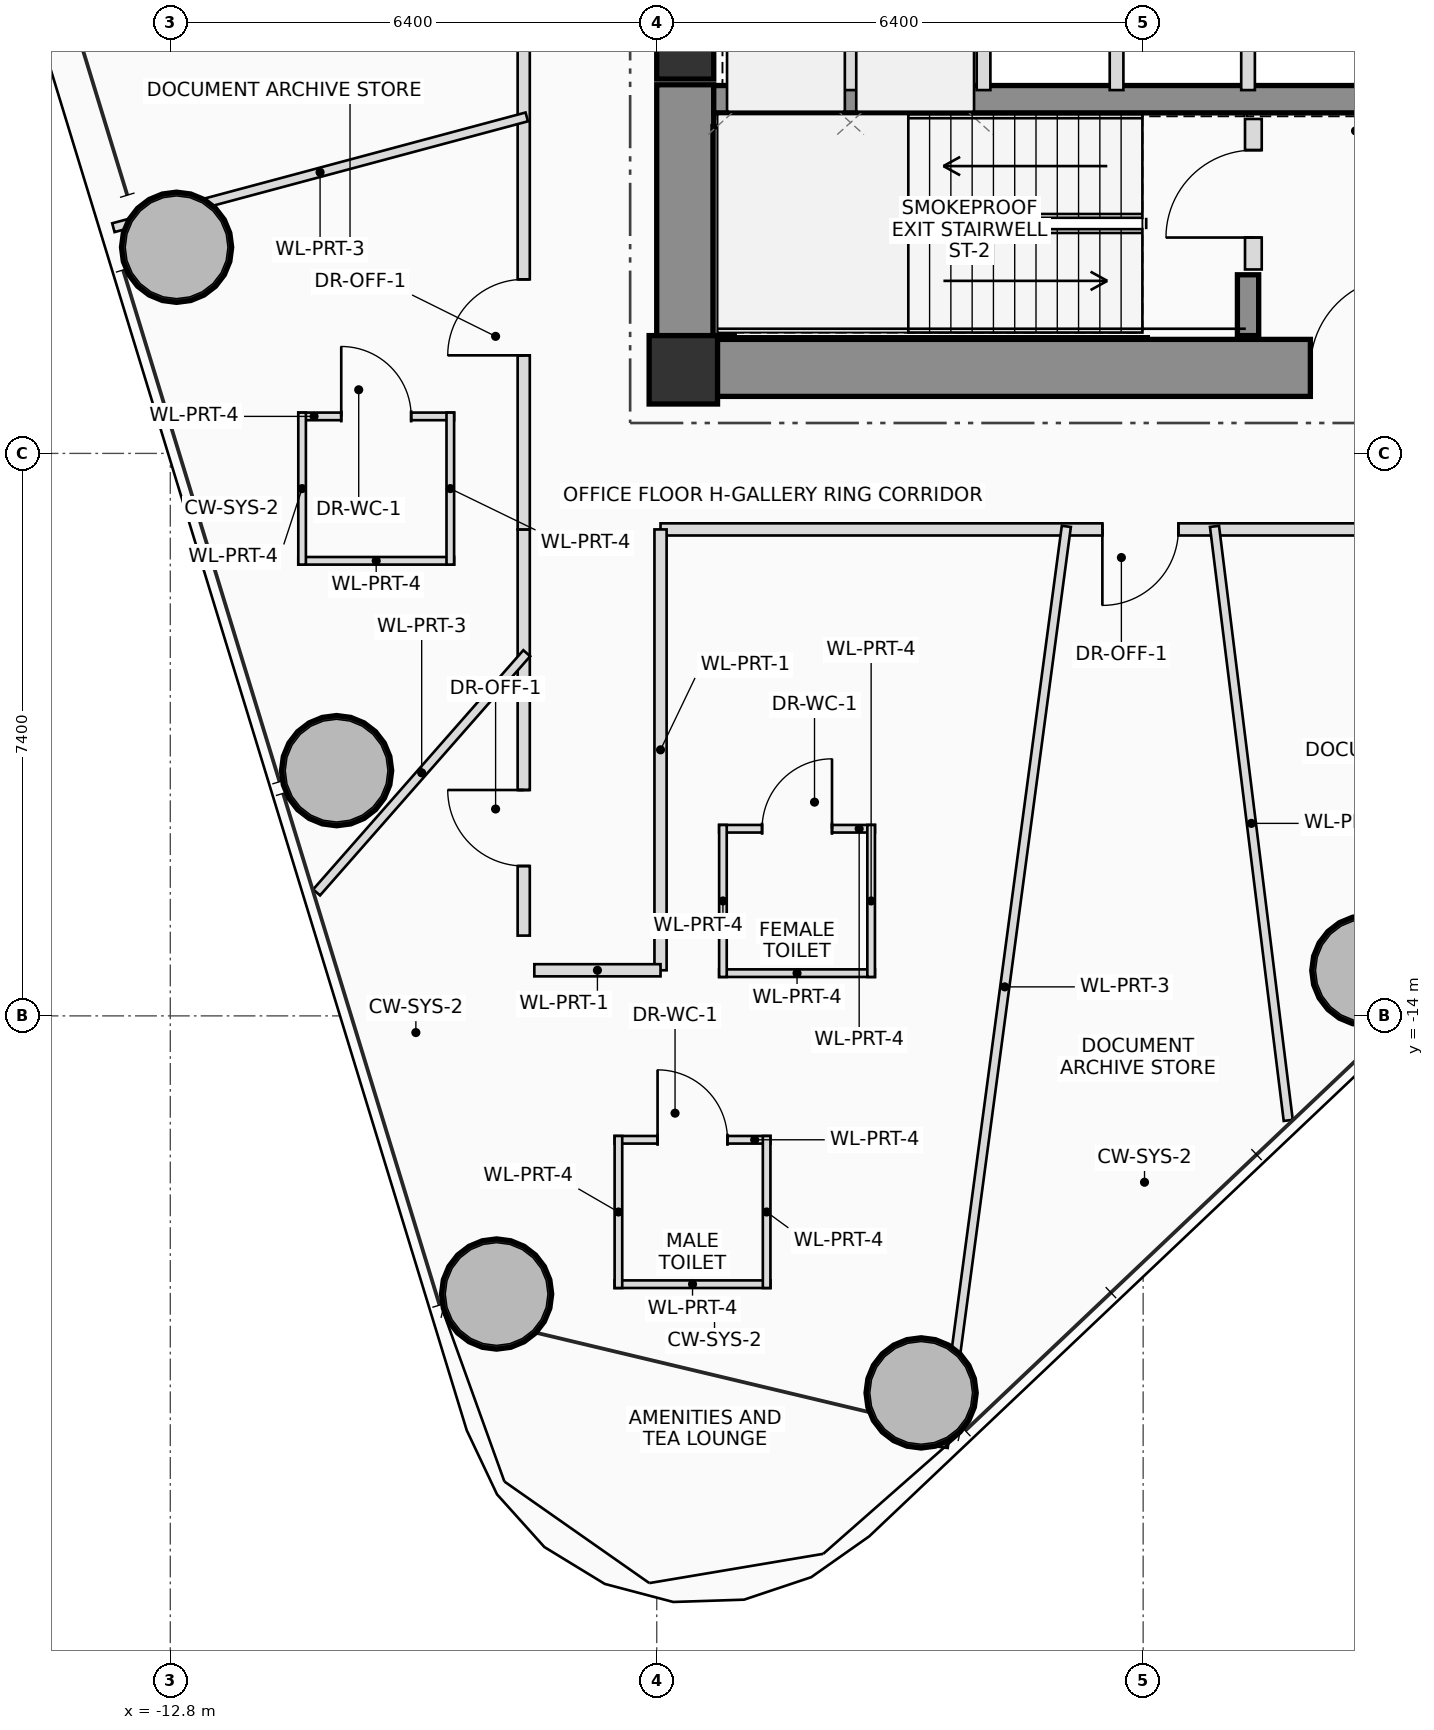
"""IFC4 building model, lengths in metres.
Left out: names, types, materials, properties, quantities, classifications, styles, units other than length and angle.
Written with IfcOpenShell. Run it as: python <this file> out.ifc"""

import sys

from ifc_helpers import new_model, si_unit, direction, frame, frame_2d, origin, origin_2d, place, context, subcontext, project, spatial, rectangle, hollow_circle, extrude, source, transform, mapped, element, fill, save


model = new_model("IFC4")
c1 = context("Model", 3, precision=1e-05, world=origin(), true_north=direction((0.0, 1.0)))
c2 = subcontext(c1, "Body", "Model", "MODEL_VIEW")
j1 = project(units=[si_unit("LENGTHUNIT", "METRE"), si_unit("PLANEANGLEUNIT", "RADIAN")], contexts=[c1])
p1 = place(None, origin())
s1 = spatial("IfcSite", under=j1, at=p1, CompositionType="ELEMENT")
p2 = place(p1, origin())
s2 = spatial("IfcBuilding", under=s1, at=p2, CompositionType="ELEMENT")
p3 = place(p2, frame((0.0, 0.0, 112.4)))
s3 = spatial("IfcBuildingStorey", under=s2, at=p3, CompositionType="ELEMENT", Elevation=112.4)
m1 = source(origin(), c2, "Body", "SweptSolid", [
    extrude(rectangle(XDim=0.9, YDim=0.9, at=origin_2d()), origin(), (0.0, 0.0, 1.0), 3.75),
])
p4 = place(p3, frame((-6.05, -5.5, 0.0), z_axis=(0.0, 0.0, 1.0), x_axis=(1.0, 0.0, 0.0)))
e1 = element("IfcColumn", 1, at=p4, inside=s3, PredefinedType="COLUMN", context=c2, shape_type="MappedRepresentation", body=[
    mapped(m1, transform((0.0, 0.0, 0.0), scale=1.0)),
])
p5 = place(p3, frame((-6.4, -5.475, 0.0), z_axis=(0.0, 0.0, 1.0), x_axis=(1.0, 0.0, 0.0)))
e2 = element("IfcWall", 2, at=p5, inside=s3, PredefinedType="SHEAR", context=c2, shape_type="SweptSolid", body=[
    extrude(rectangle(XDim=12.8, YDim=0.75, at=frame_2d((6.4, 0.0))), origin(), (0.0, 0.0, 1.0), 3.75),
])
p6 = place(p5, frame((8.6, 0.0, 0.0)))
e3 = element("IfcOpeningElement", 3, at=p6, cuts=e2, PredefinedType="OPENING", context=c2, shape_type="SweptSolid", body=[
    extrude(rectangle(XDim=1.2, YDim=2.2, at=frame_2d((0.6, 1.1))), frame((0.0, 0.385, 0.0), z_axis=(0.0, -1.0, 0.0), x_axis=(1.0, 0.0, 0.0)), (0.0, 0.0, 1.0), 0.77),
])
p7 = place(p3, frame((-6.025, -5.1, 0.0), z_axis=(0.0, 0.0, 1.0), x_axis=(0.0, 1.0, 0.0)))
e4 = element("IfcWall", 4, at=p7, inside=s3, PredefinedType="SHEAR", context=c2, shape_type="SweptSolid", body=[
    extrude(rectangle(XDim=3.35, YDim=0.75, at=frame_2d((1.675, 0.0))), origin(), (0.0, 0.0, 1.0), 3.75),
])
p8 = place(p3, frame((-5.65, -1.94, 0.0), z_axis=(0.0, 0.0, 1.0), x_axis=(1.0, 0.0, 0.0)))
e5 = element("IfcWall", 5, at=p8, inside=s3, PredefinedType="SHEAR", context=c2, shape_type="SweptSolid", body=[
    extrude(rectangle(XDim=11.3, YDim=0.36, at=frame_2d((5.65, 0.0))), origin(), (0.0, 0.0, 1.0), 3.75),
])
p9 = place(p3, frame((-5.52, -5.05, 0.0), z_axis=(0.0, 0.0, 1.0), x_axis=(0.0, 1.0, 0.0)))
e6 = element("IfcWall", 6, at=p9, inside=s3, PredefinedType="SHEAR", context=c2, shape_type="SweptSolid", body=[
    extrude(rectangle(XDim=2.75, YDim=0.28, at=frame_2d((1.375, 0.0))), origin(), (0.0, 0.0, 1.0), 3.75),
])
p10 = place(p3, frame((1.38, -5.05, 0.0), z_axis=(0.0, 0.0, 1.0), x_axis=(0.0, 1.0, 0.0)))
e7 = element("IfcWall", 7, at=p10, inside=s3, PredefinedType="SHEAR", context=c2, shape_type="SweptSolid", body=[
    extrude(rectangle(XDim=0.8, YDim=0.28, at=frame_2d((0.4, 0.0))), origin(), (0.0, 0.0, 1.0), 3.75),
])
m2 = source(origin(), c2, "Body", "SweptSolid", [
    extrude(rectangle(XDim=0.75, YDim=0.75, at=origin_2d()), origin(), (0.0, 0.0, 1.0), 3.75),
])
p11 = place(p3, frame((-6.025, -1.3, 0.0), z_axis=(0.0, 0.0, 1.0), x_axis=(1.0, 0.0, 0.0)))
e8 = element("IfcColumn", 8, at=p11, inside=s3, PredefinedType="COLUMN", context=c2, shape_type="MappedRepresentation", body=[
    mapped(m2, transform((0.0, 0.0, 0.0), scale=1.0)),
])
m3 = source(origin(), c2, "Body", "SweptSolid", [
    extrude(hollow_circle(Radius=0.725, WallThickness=0.05, at=origin_2d()), origin(), (0.0, 0.0, 1.0), 3.75),
])
for number, where, z_axis, x_axis in (
    (9, (-2.921, -18.96, 0.0), (0.0, 0.0, 1.0), (1.0, 0.0, 0.0)),
    (10, (2.943, -13.402, 0.0), (0.0, 0.0, 1.0), (1.0, 0.0, 0.0)),
    (11, (-12.717, -3.888, 0.0), (0.0, 0.0, 1.0), (1.0, 0.0, 0.0)),
    (12, (-10.612, -10.774, 0.0), (0.0, 0.0, 1.0), (1.0, 0.0, 0.0)),
    (13, (-8.507, -17.659, 0.0), (0.0, 0.0, 1.0), (1.0, 0.0, 0.0)),
):
    element("IfcColumn", number, at=place(p3, frame(where, z_axis=z_axis, x_axis=x_axis)), inside=s3, PredefinedType="COLUMN", context=c2, shape_type="MappedRepresentation", body=[
        mapped(m3, transform((0.0, 0.0, 0.0), scale=1.0)),
    ])
p12 = place(p3, frame((1.45, -4.18, 0.0), z_axis=(0.0, 0.0, 1.0), x_axis=(0.0, 1.0, 0.0)))
e14 = element("IfcWall", 14, at=p12, inside=s3, PredefinedType="PLUMBINGWALL", context=c2, shape_type="SweptSolid", body=[
    extrude(rectangle(XDim=1.98, YDim=0.22, at=frame_2d((0.99, 0.0))), origin(), (0.0, 0.0, 1.0), 3.545),
])
p13 = place(p12, frame((0.42, 0.0, 0.0)))
e15 = element("IfcOpeningElement", 15, at=p13, cuts=e14, PredefinedType="OPENING", context=c2, shape_type="SweptSolid", body=[
    extrude(rectangle(XDim=1.15, YDim=2.15, at=frame_2d((0.575, 1.075))), frame((0.0, 0.12, 0.0), z_axis=(0.0, -1.0, 0.0), x_axis=(1.0, 0.0, 0.0)), (0.0, 0.0, 1.0), 0.24),
])
for number, where, z_axis, x_axis in (
    (16, (-3.85, -1.82, 0.0), (0.0, 0.0, 1.0), (0.0, 1.0, 0.0)),
    (17, (-2.1, -1.82, 0.0), (0.0, 0.0, 1.0), (0.0, 1.0, 0.0)),
    (18, (-0.35, -1.82, 0.0), (0.0, 0.0, 1.0), (0.0, 1.0, 0.0)),
    (19, (1.38, -1.82, 0.0), (0.0, 0.0, 1.0), (0.0, 1.0, 0.0)),
):
    element("IfcWall", number, at=place(p3, frame(where, z_axis=z_axis, x_axis=x_axis)), inside=s3, PredefinedType="PLUMBINGWALL", context=c2, shape_type="SweptSolid", body=[
        extrude(rectangle(XDim=0.98, YDim=0.18, at=frame_2d((0.49, 0.0))), origin(), (0.0, 0.0, 1.0), 3.545),
    ])
p14 = place(p3, frame((-6.954, -15.63, 0.0), z_axis=(0.0, 0.0, 1.0), x_axis=(1.0, 0.0, 0.0)))
e20 = element("IfcWall", 20, at=p14, inside=s3, PredefinedType="PARTITIONING", context=c2, shape_type="SweptSolid", body=[
    extrude(rectangle(XDim=2.05, YDim=0.1, at=frame_2d((1.025, 0.0))), origin(), (0.0, 0.0, 1.0), 3.545),
])
p15 = place(p14, frame((0.565, 0.0, 0.0)))
e21 = element("IfcOpeningElement", 21, at=p15, cuts=e20, PredefinedType="OPENING", context=c2, shape_type="SweptSolid", body=[
    extrude(rectangle(XDim=0.92, YDim=2.1, at=frame_2d((0.46, 1.05))), frame((0.0, 0.06, 0.0), z_axis=(0.0, -1.0, 0.0), x_axis=(1.0, 0.0, 0.0)), (0.0, 0.0, 1.0), 0.12),
])
p16 = place(p3, frame((-4.904, -17.53, 0.0), z_axis=(0.0, 0.0, 1.0), x_axis=(-1.0, 0.0, 0.0)))
e22 = element("IfcWall", 22, at=p16, inside=s3, PredefinedType="PARTITIONING", context=c2, shape_type="SweptSolid", body=[
    extrude(rectangle(XDim=2.05, YDim=0.1, at=frame_2d((1.025, 0.0))), origin(), (0.0, 0.0, 1.0), 3.545),
])
for number, where, z_axis, x_axis in (
    (23, (-4.954, -15.58, 0.0), (0.0, 0.0, 1.0), (0.0, -1.0, 0.0)),
    (24, (-6.904, -17.58, 0.0), (0.0, 0.0, 1.0), (0.0, 1.0, 0.0)),
):
    element("IfcWall", number, at=place(p3, frame(where, z_axis=z_axis, x_axis=x_axis)), inside=s3, PredefinedType="PARTITIONING", context=c2, shape_type="SweptSolid", body=[
        extrude(rectangle(XDim=2.0, YDim=0.1, at=frame_2d((1.0, 0.0))), origin(), (0.0, 0.0, 1.0), 3.545),
    ])
p17 = place(p3, frame((-5.579, -11.538, 0.0), z_axis=(0.0, 0.0, 1.0), x_axis=(1.0, 0.0, 0.0)))
e25 = element("IfcWall", 25, at=p17, inside=s3, PredefinedType="PARTITIONING", context=c2, shape_type="SweptSolid", body=[
    extrude(rectangle(XDim=2.05, YDim=0.1, at=frame_2d((1.025, 0.0))), origin(), (0.0, 0.0, 1.0), 2.85),
])
p18 = place(p17, frame((0.565, 0.0, 0.0)))
e26 = element("IfcOpeningElement", 26, at=p18, cuts=e25, PredefinedType="OPENING", context=c2, shape_type="SweptSolid", body=[
    extrude(rectangle(XDim=0.92, YDim=2.1, at=frame_2d((0.46, 1.05))), frame((0.0, 0.06, 0.0), z_axis=(0.0, -1.0, 0.0), x_axis=(1.0, 0.0, 0.0)), (0.0, 0.0, 1.0), 0.12),
])
p19 = place(p3, frame((-3.529, -13.438, 0.0), z_axis=(0.0, 0.0, 1.0), x_axis=(-1.0, 0.0, 0.0)))
e27 = element("IfcWall", 27, at=p19, inside=s3, PredefinedType="PARTITIONING", context=c2, shape_type="SweptSolid", body=[
    extrude(rectangle(XDim=2.05, YDim=0.1, at=frame_2d((1.025, 0.0))), origin(), (0.0, 0.0, 1.0), 2.85),
])
for number, where, z_axis, x_axis in (
    (28, (-3.579, -11.488, 0.0), (0.0, 0.0, 1.0), (0.0, -1.0, 0.0)),
    (29, (-5.529, -13.488, 0.0), (0.0, 0.0, 1.0), (0.0, 1.0, 0.0)),
):
    element("IfcWall", number, at=place(p3, frame(where, z_axis=z_axis, x_axis=x_axis)), inside=s3, PredefinedType="PARTITIONING", context=c2, shape_type="SweptSolid", body=[
        extrude(rectangle(XDim=2.0, YDim=0.1, at=frame_2d((1.0, 0.0))), origin(), (0.0, 0.0, 1.0), 3.05),
    ])
p20 = place(p3, frame((-11.116, -6.113, 0.0), z_axis=(0.0, 0.0, 1.0), x_axis=(1.0, 0.0, 0.0)))
e30 = element("IfcWall", 30, at=p20, inside=s3, PredefinedType="PARTITIONING", context=c2, shape_type="SweptSolid", body=[
    extrude(rectangle(XDim=2.05, YDim=0.1, at=frame_2d((1.025, 0.0))), origin(), (0.0, 0.0, 1.0), 3.2),
])
p21 = place(p20, frame((0.565, 0.0, 0.0)))
e31 = element("IfcOpeningElement", 31, at=p21, cuts=e30, PredefinedType="OPENING", context=c2, shape_type="SweptSolid", body=[
    extrude(rectangle(XDim=0.92, YDim=2.1, at=frame_2d((0.46, 1.05))), frame((0.0, 0.06, 0.0), z_axis=(0.0, -1.0, 0.0), x_axis=(1.0, 0.0, 0.0)), (0.0, 0.0, 1.0), 0.12),
])
p22 = place(p3, frame((-9.066, -8.013, 0.0), z_axis=(0.0, 0.0, 1.0), x_axis=(-1.0, 0.0, 0.0)))
e32 = element("IfcWall", 32, at=p22, inside=s3, PredefinedType="PARTITIONING", context=c2, shape_type="SweptSolid", body=[
    extrude(rectangle(XDim=2.05, YDim=0.1, at=frame_2d((1.025, 0.0))), origin(), (0.0, 0.0, 1.0), 3.2),
])
p23 = place(p3, frame((-9.116, -6.063, 0.0), z_axis=(0.0, 0.0, 1.0), x_axis=(0.0, -1.0, 0.0)))
e33 = element("IfcWall", 33, at=p23, inside=s3, PredefinedType="PARTITIONING", context=c2, shape_type="SweptSolid", body=[
    extrude(rectangle(XDim=2.0, YDim=0.1, at=frame_2d((1.0, 0.0))), origin(), (0.0, 0.0, 1.0), 3.05),
])
p24 = place(p3, frame((-11.066, -8.063, 0.0), z_axis=(0.0, 0.0, 1.0), x_axis=(0.0, 1.0, 0.0)))
e34 = element("IfcWall", 34, at=p24, inside=s3, PredefinedType="PARTITIONING", context=c2, shape_type="SweptSolid", body=[
    extrude(rectangle(XDim=2.0, YDim=0.1, at=frame_2d((1.0, 0.0))), origin(), (0.0, 0.0, 1.0), 3.545),
])
p25 = place(p3, frame((-8.15, -12.944, 0.0), z_axis=(0.0, 0.0, 1.0), x_axis=(0.0, 1.0, 0.0)))
e35 = element("IfcWall", 35, at=p25, inside=s3, PredefinedType="PARTITIONING", context=c2, shape_type="SweptSolid", body=[
    extrude(rectangle(XDim=5.344, YDim=0.16, at=frame_2d((2.672, 0.0))), origin(), (0.0, 0.0, 1.0), 2.85),
])
p26 = place(p25, frame((0.916, 0.0, 0.0)))
e36 = element("IfcOpeningElement", 36, at=p26, cuts=e35, PredefinedType="OPENING", context=c2, shape_type="SweptSolid", body=[
    extrude(rectangle(XDim=1.0, YDim=2.25, at=frame_2d((0.5, 1.125))), frame((0.0, 0.09, 0.0), z_axis=(0.0, -1.0, 0.0), x_axis=(1.0, 0.0, 0.0)), (0.0, 0.0, 1.0), 0.18),
])
p27 = place(p3, frame((-8.15, -7.6, 0.0), z_axis=(0.0, 0.0, 1.0), x_axis=(0.0, 1.0, 0.0)))
e37 = element("IfcWall", 37, at=p27, inside=s3, PredefinedType="PARTITIONING", context=c2, shape_type="SweptSolid", body=[
    extrude(rectangle(XDim=15.2, YDim=0.16, at=frame_2d((7.6, 0.0))), origin(), (0.0, 0.0, 1.0), 2.85),
])
p28 = place(p27, frame((2.29, 0.0, 0.0)))
e38 = element("IfcOpeningElement", 38, at=p28, cuts=e37, PredefinedType="OPENING", context=c2, shape_type="SweptSolid", body=[
    extrude(rectangle(XDim=1.0, YDim=2.25, at=frame_2d((0.5, 1.125))), frame((0.0, 0.09, 0.0), z_axis=(0.0, -1.0, 0.0), x_axis=(1.0, 0.0, 0.0)), (0.0, 0.0, 1.0), 0.18),
])
p29 = place(p27, frame((7.0, 0.0, 0.0)))
e39 = element("IfcOpeningElement", 39, at=p29, cuts=e37, PredefinedType="OPENING", context=c2, shape_type="SweptSolid", body=[
    extrude(rectangle(XDim=1.0, YDim=2.25, at=frame_2d((0.5, 1.125))), frame((0.0, 0.09, 0.0), z_axis=(0.0, -1.0, 0.0), x_axis=(1.0, 0.0, 0.0)), (0.0, 0.0, 1.0), 0.18),
])
p30 = place(p27, frame((10.325, 0.0, 0.0)))
e40 = element("IfcOpeningElement", 40, at=p30, cuts=e37, PredefinedType="OPENING", context=c2, shape_type="SweptSolid", body=[
    extrude(rectangle(XDim=1.0, YDim=2.25, at=frame_2d((0.5, 1.125))), frame((0.0, 0.09, 0.0), z_axis=(0.0, -1.0, 0.0), x_axis=(1.0, 0.0, 0.0)), (0.0, 0.0, 1.0), 0.18),
])
p31 = place(p27, frame((13.035, 0.0, 0.0)))
e41 = element("IfcOpeningElement", 41, at=p31, cuts=e37, PredefinedType="OPENING", context=c2, shape_type="SweptSolid", body=[
    extrude(rectangle(XDim=1.0, YDim=2.25, at=frame_2d((0.5, 1.125))), frame((0.0, 0.09, 0.0), z_axis=(0.0, -1.0, 0.0), x_axis=(1.0, 0.0, 0.0)), (0.0, 0.0, 1.0), 0.18),
])
p32 = place(p3, frame((6.35, -7.6, 0.0), z_axis=(0.0, 0.0, 1.0), x_axis=(-1.0, 0.0, 0.0)))
e42 = element("IfcWall", 42, at=p32, inside=s3, PredefinedType="PARTITIONING", context=c2, shape_type="SweptSolid", body=[
    extrude(rectangle(XDim=12.7, YDim=0.16, at=frame_2d((6.35, 0.0))), origin(), (0.0, 0.0, 1.0), 2.85),
])
p33 = place(p32, frame((5.887, 0.0, 0.0)))
e43 = element("IfcOpeningElement", 43, at=p33, cuts=e42, PredefinedType="OPENING", context=c2, shape_type="SweptSolid", body=[
    extrude(rectangle(XDim=1.0, YDim=2.25, at=frame_2d((0.5, 1.125))), frame((0.0, 0.09, 0.0), z_axis=(0.0, -1.0, 0.0), x_axis=(1.0, 0.0, 0.0)), (0.0, 0.0, 1.0), 0.18),
])
p34 = place(p3, frame((-6.35, -7.6, 0.0), z_axis=(0.0, 0.0, 1.0), x_axis=(0.0, -1.0, 0.0)))
e44 = element("IfcWall", 44, at=p34, inside=s3, PredefinedType="PARTITIONING", context=c2, shape_type="SweptSolid", body=[
    extrude(rectangle(XDim=5.8, YDim=0.16, at=frame_2d((2.9, 0.0))), origin(), (0.0, 0.0, 1.0), 2.85),
])
p35 = place(p3, frame((-6.35, -13.4, 0.0), z_axis=(0.0, 0.0, 1.0), x_axis=(-1.0, 0.0, 0.0)))
e45 = element("IfcWall", 45, at=p35, inside=s3, PredefinedType="PARTITIONING", context=c2, shape_type="SweptSolid", body=[
    extrude(rectangle(XDim=1.66, YDim=0.16, at=frame_2d((0.83, 0.0))), origin(), (0.0, 0.0, 1.0), 2.85),
])
p36 = place(p3, frame((-8.11, -2.173, 0.0), z_axis=(0.0, 0.0, 1.0), x_axis=(-0.965926955368, -0.258814831287, 0.0)))
e46 = element("IfcWall", 46, at=p36, inside=s3, PredefinedType="PARTITIONING", context=c2, shape_type="SweptSolid", body=[
    extrude(rectangle(XDim=5.631, YDim=0.12, at=frame_2d((2.815, 0.0))), origin(), (0.0, 0.0, 1.0), 3.05),
])
p37 = place(p3, frame((-8.11, -9.229, 0.0), z_axis=(0.0, 0.0, 1.0), x_axis=(-0.66009168755, -0.751185039805, 0.0)))
e47 = element("IfcWall", 47, at=p37, inside=s3, PredefinedType="PARTITIONING", context=c2, shape_type="SweptSolid", body=[
    extrude(rectangle(XDim=4.189, YDim=0.12, at=frame_2d((2.094, 0.0))), origin(), (0.0, 0.0, 1.0), 3.01),
])
p38 = place(p3, frame((-1.011, -7.56, 0.0), z_axis=(0.0, 0.0, 1.0), x_axis=(-0.132529998166, -0.991178994726, 0.0)))
e48 = element("IfcWall", 48, at=p38, inside=s3, PredefinedType="PARTITIONING", context=c2, shape_type="SweptSolid", body=[
    extrude(rectangle(XDim=12.225, YDim=0.12, at=frame_2d((6.112, 0.0))), origin(), (0.0, 0.0, 1.0), 3.01),
])
p39 = place(p3, frame((0.939, -7.56, 0.0), z_axis=(0.0, 0.0, 1.0), x_axis=(0.12317613507, -0.992384824425, 0.0)))
e49 = element("IfcWall", 49, at=p39, inside=s3, PredefinedType="PARTITIONING", context=c2, shape_type="SweptSolid", body=[
    extrude(rectangle(XDim=7.875, YDim=0.12, at=frame_2d((3.938, 0.0))), origin(), (0.0, 0.0, 1.0), 3.01),
])
p40 = place(p6, origin())
e50 = element("IfcDoor", 50, at=p40, inside=s3, OperationType="SINGLE_SWING_RIGHT", PredefinedType="DOOR", context=c2, shape_type="SweptSolid", body=[
    extrude(rectangle(XDim=1.2, YDim=2.2, at=frame_2d((0.6, 1.1))), frame((0.0, 0.025, 0.0), z_axis=(0.0, -1.0, 0.0), x_axis=(1.0, 0.0, 0.0)), (0.0, 0.0, 1.0), 0.05),
])
fill(e3, e50)
p41 = place(p13, origin())
e51 = element("IfcDoor", 51, at=p41, inside=s3, OperationType="SINGLE_SWING_LEFT", PredefinedType="DOOR", context=c2, shape_type="SweptSolid", body=[
    extrude(rectangle(XDim=1.15, YDim=2.15, at=frame_2d((0.575, 1.075))), frame((0.0, 0.025, 0.0), z_axis=(0.0, -1.0, 0.0), x_axis=(1.0, 0.0, 0.0)), (0.0, 0.0, 1.0), 0.05),
])
fill(e15, e51)
p42 = place(p15, origin())
e52 = element("IfcDoor", 52, at=p42, inside=s3, OperationType="SINGLE_SWING_LEFT", PredefinedType="DOOR", context=c2, shape_type="SweptSolid", body=[
    extrude(rectangle(XDim=0.92, YDim=2.1, at=frame_2d((0.46, 1.05))), frame((0.0, 0.025, 0.0), z_axis=(0.0, -1.0, 0.0), x_axis=(1.0, 0.0, 0.0)), (0.0, 0.0, 1.0), 0.05),
])
fill(e21, e52)
p43 = place(p18, origin())
e53 = element("IfcDoor", 53, at=p43, inside=s3, OperationType="SINGLE_SWING_RIGHT", PredefinedType="DOOR", context=c2, shape_type="SweptSolid", body=[
    extrude(rectangle(XDim=0.92, YDim=2.1, at=frame_2d((0.46, 1.05))), frame((0.0, 0.025, 0.0), z_axis=(0.0, -1.0, 0.0), x_axis=(1.0, 0.0, 0.0)), (0.0, 0.0, 1.0), 0.05),
])
fill(e26, e53)
p44 = place(p21, origin())
e54 = element("IfcDoor", 54, at=p44, inside=s3, OperationType="SINGLE_SWING_LEFT", PredefinedType="DOOR", context=c2, shape_type="SweptSolid", body=[
    extrude(rectangle(XDim=0.92, YDim=2.1, at=frame_2d((0.46, 1.05))), frame((0.0, 0.025, 0.0), z_axis=(0.0, -1.0, 0.0), x_axis=(1.0, 0.0, 0.0)), (0.0, 0.0, 1.0), 0.05),
])
fill(e31, e54)
p45 = place(p26, origin())
e55 = element("IfcDoor", 55, at=p45, inside=s3, OperationType="SINGLE_SWING_RIGHT", PredefinedType="DOOR", context=c2, shape_type="SweptSolid", body=[
    extrude(rectangle(XDim=1.0, YDim=2.25, at=frame_2d((0.5, 1.125))), frame((0.0, 0.025, 0.0), z_axis=(0.0, -1.0, 0.0), x_axis=(1.0, 0.0, 0.0)), (0.0, 0.0, 1.0), 0.05),
])
fill(e36, e55)
p46 = place(p28, origin())
e56 = element("IfcDoor", 56, at=p46, inside=s3, OperationType="SINGLE_SWING_LEFT", PredefinedType="DOOR", context=c2, shape_type="SweptSolid", body=[
    extrude(rectangle(XDim=1.0, YDim=2.25, at=frame_2d((0.5, 1.125))), frame((0.0, 0.025, 0.0), z_axis=(0.0, -1.0, 0.0), x_axis=(1.0, 0.0, 0.0)), (0.0, 0.0, 1.0), 0.05),
])
fill(e38, e56)
p47 = place(p33, origin())
e57 = element("IfcDoor", 57, at=p47, inside=s3, OperationType="SINGLE_SWING_RIGHT", PredefinedType="DOOR", context=c2, shape_type="SweptSolid", body=[
    extrude(rectangle(XDim=1.0, YDim=2.25, at=frame_2d((0.5, 1.125))), frame((0.0, 0.025, 0.0), z_axis=(0.0, -1.0, 0.0), x_axis=(1.0, 0.0, 0.0)), (0.0, 0.0, 1.0), 0.05),
])
fill(e43, e57)
save(model, sys.argv[1])
